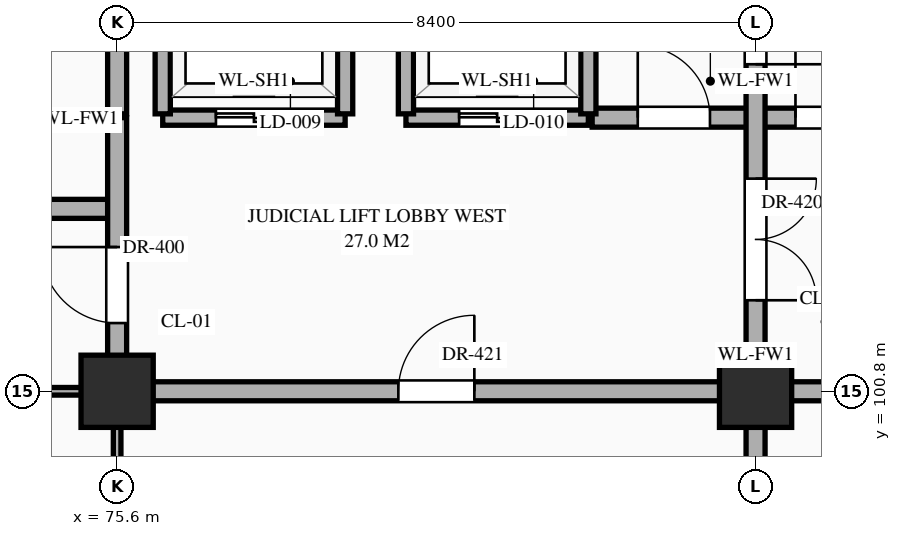
"""IFC4 building model, lengths in metres.
Left out: names, types, materials, properties, quantities, classifications, styles, units other than length and angle.
Written with IfcOpenShell. Run it as: python <this file> out.ifc"""

import sys

from ifc_helpers import new_model, si_unit, direction, frame, frame_2d, origin, origin_2d, place, context, subcontext, project, spatial, rectangle, extrude, element, fill, save


model = new_model("IFC4")
c1 = context("Model", 3, precision=1e-05, world=origin(), true_north=direction((0.0, 1.0)))
c2 = subcontext(c1, "Body", "Model", "MODEL_VIEW")
j1 = project(units=[si_unit("LENGTHUNIT", "METRE"), si_unit("PLANEANGLEUNIT", "RADIAN")], contexts=[c1])
p1 = place(None, origin())
s1 = spatial("IfcSite", under=j1, at=p1, CompositionType="ELEMENT")
p2 = place(p1, origin())
s2 = spatial("IfcBuilding", under=s1, at=p2, CompositionType="ELEMENT")
p3 = place(p2, frame((0.0, 0.0, -5.4)))
s3 = spatial("IfcBuildingStorey", under=s2, at=p3, CompositionType="ELEMENT", Elevation=-5.4)
for number, where, z_axis, x_axis in (
    (1, (75.6, 100.8, 0.0), (0.0, 0.0, 1.0), (1.0, 0.0, 0.0)),
    (2, (84.0, 100.8, 0.0), (0.0, 0.0, 1.0), (1.0, 0.0, 0.0)),
):
    element("IfcColumn", number, at=place(p3, frame(where, z_axis=z_axis, x_axis=x_axis)), inside=s3, PredefinedType="COLUMN", context=c2, shape_type="SweptSolid", body=[
        extrude(rectangle(XDim=0.95, YDim=0.95, at=origin_2d()), origin(), (0.0, 0.0, 1.0), 5.4),
    ])
p4 = place(p3, frame((71.4, 100.8, 0.0), z_axis=(0.0, 0.0, 1.0), x_axis=(1.0, 0.0, 0.0)))
e3 = element("IfcWall", 3, at=p4, inside=s3, PredefinedType="STANDARD", context=c2, shape_type="SweptSolid", body=[
    extrude(rectangle(XDim=4.2, YDim=0.1, at=frame_2d((2.1, 0.0))), origin(), (0.0, 0.0, 1.0), 4.25),
])
p5 = place(p4, frame((1.282, 0.0, 0.0)))
e4 = element("IfcOpeningElement", 4, at=p5, cuts=e3, PredefinedType="OPENING", context=c2, shape_type="SweptSolid", body=[
    extrude(rectangle(XDim=1.24, YDim=2.3, at=frame_2d((0.62, 1.15))), frame((0.0, 0.062, 0.0), z_axis=(0.0, -1.0, 0.0), x_axis=(1.0, 0.0, 0.0)), (0.0, 0.0, 1.0), 0.124),
])
p6 = place(p3, frame((75.6, 100.8, 0.0), z_axis=(0.0, 0.0, 1.0), x_axis=(1.0, 0.0, 0.0)))
e5 = element("IfcWall", 5, at=p6, inside=s3, PredefinedType="STANDARD", context=c2, shape_type="SweptSolid", body=[
    extrude(rectangle(XDim=16.8, YDim=0.25, at=frame_2d((8.4, 0.0))), origin(), (0.0, 0.0, 1.0), 4.25),
])
p7 = place(p6, frame((3.7, 0.0, 0.0)))
e6 = element("IfcOpeningElement", 6, at=p7, cuts=e5, PredefinedType="OPENING", context=c2, shape_type="SweptSolid", body=[
    extrude(rectangle(XDim=1.0, YDim=2.2, at=frame_2d((0.5, 1.1))), frame((0.0, 0.137, 0.0), z_axis=(0.0, -1.0, 0.0), x_axis=(1.0, 0.0, 0.0)), (0.0, 0.0, 1.0), 0.274),
])
p8 = place(p6, frame((9.748, 0.0, 0.0)))
e7 = element("IfcOpeningElement", 7, at=p8, cuts=e5, PredefinedType="OPENING", context=c2, shape_type="SweptSolid", body=[
    extrude(rectangle(XDim=1.1, YDim=2.2, at=frame_2d((0.55, 1.1))), frame((0.0, 0.137, 0.0), z_axis=(0.0, -1.0, 0.0), x_axis=(1.0, 0.0, 0.0)), (0.0, 0.0, 1.0), 0.274),
])
p9 = place(p6, frame((12.5, 0.0, 0.0)))
e8 = element("IfcOpeningElement", 8, at=p9, cuts=e5, PredefinedType="OPENING", context=c2, shape_type="SweptSolid", body=[
    extrude(rectangle(XDim=1.0, YDim=2.2, at=frame_2d((0.5, 1.1))), frame((0.0, 0.137, 0.0), z_axis=(0.0, -1.0, 0.0), x_axis=(1.0, 0.0, 0.0)), (0.0, 0.0, 1.0), 0.274),
])
p10 = place(p6, frame((14.827, 0.0, 0.0)))
e9 = element("IfcOpeningElement", 9, at=p10, cuts=e5, PredefinedType="OPENING", context=c2, shape_type="SweptSolid", body=[
    extrude(rectangle(XDim=0.95, YDim=2.15, at=frame_2d((0.475, 1.075))), frame((0.0, 0.137, 0.0), z_axis=(0.0, -1.0, 0.0), x_axis=(1.0, 0.0, 0.0)), (0.0, 0.0, 1.0), 0.274),
])
p11 = place(p3, frame((71.4, 103.2, 0.0), z_axis=(0.0, 0.0, 1.0), x_axis=(1.0, 0.0, 0.0)))
e10 = element("IfcWall", 10, at=p11, inside=s3, PredefinedType="STANDARD", context=c2, shape_type="SweptSolid", body=[
    extrude(rectangle(XDim=4.2, YDim=0.25, at=frame_2d((2.1, 0.0))), origin(), (0.0, 0.0, 1.0), 5.1),
])
p12 = place(p11, frame((1.55, 0.0, 0.0)))
e11 = element("IfcOpeningElement", 11, at=p12, cuts=e10, PredefinedType="OPENING", context=c2, shape_type="SweptSolid", body=[
    extrude(rectangle(XDim=1.1, YDim=2.2, at=frame_2d((0.55, 1.1))), frame((0.0, 0.137, 0.0), z_axis=(0.0, -1.0, 0.0), x_axis=(1.0, 0.0, 0.0)), (0.0, 0.0, 1.0), 0.274),
])
p13 = place(p3, frame((76.2, 104.4, 0.0), z_axis=(0.0, 0.0, 1.0), x_axis=(1.0, 0.0, 0.0)))
e12 = element("IfcWall", 12, at=p13, inside=s3, PredefinedType="STANDARD", context=c2, shape_type="SweptSolid", body=[
    extrude(rectangle(XDim=2.4, YDim=0.2, at=frame_2d((1.2, 0.0))), origin(), (0.0, 0.0, 1.0), 5.1),
])
p14 = place(p13, frame((0.7, 0.0, 0.0)))
e13 = element("IfcOpeningElement", 13, at=p14, cuts=e12, PredefinedType="OPENING", context=c2, shape_type="SweptSolid", body=[
    extrude(rectangle(XDim=1.0, YDim=2.15, at=frame_2d((0.5, 1.075))), frame((0.0, 0.112, 0.0), z_axis=(0.0, -1.0, 0.0), x_axis=(1.0, 0.0, 0.0)), (0.0, 0.0, 1.0), 0.224),
])
p15 = place(p3, frame((79.4, 104.4, 0.0), z_axis=(0.0, 0.0, 1.0), x_axis=(1.0, 0.0, 0.0)))
e14 = element("IfcWall", 14, at=p15, inside=s3, PredefinedType="STANDARD", context=c2, shape_type="SweptSolid", body=[
    extrude(rectangle(XDim=2.4, YDim=0.2, at=frame_2d((1.2, 0.0))), origin(), (0.0, 0.0, 1.0), 5.1),
])
p16 = place(p15, frame((0.7, 0.0, 0.0)))
e15 = element("IfcOpeningElement", 15, at=p16, cuts=e14, PredefinedType="OPENING", context=c2, shape_type="SweptSolid", body=[
    extrude(rectangle(XDim=1.0, YDim=2.15, at=frame_2d((0.5, 1.075))), frame((0.0, 0.112, 0.0), z_axis=(0.0, -1.0, 0.0), x_axis=(1.0, 0.0, 0.0)), (0.0, 0.0, 1.0), 0.224),
])
p17 = place(p3, frame((81.85, 104.4, 0.0), z_axis=(0.0, 0.0, 1.0), x_axis=(1.0, 0.0, 0.0)))
e16 = element("IfcWall", 16, at=p17, inside=s3, PredefinedType="STANDARD", context=c2, shape_type="SweptSolid", body=[
    extrude(rectangle(XDim=4.3, YDim=0.25, at=frame_2d((2.15, 0.0))), origin(), (0.0, 0.0, 1.0), 5.1),
])
p18 = place(p17, frame((0.6, 0.0, 0.0)))
e17 = element("IfcOpeningElement", 17, at=p18, cuts=e16, PredefinedType="OPENING", context=c2, shape_type="SweptSolid", body=[
    extrude(rectangle(XDim=0.95, YDim=2.15, at=frame_2d((0.475, 1.075))), frame((0.0, 0.137, 0.0), z_axis=(0.0, -1.0, 0.0), x_axis=(1.0, 0.0, 0.0)), (0.0, 0.0, 1.0), 0.274),
])
p19 = place(p17, frame((2.675, 0.0, 0.0)))
e18 = element("IfcOpeningElement", 18, at=p19, cuts=e16, PredefinedType="OPENING", context=c2, shape_type="SweptSolid", body=[
    extrude(rectangle(XDim=1.1, YDim=2.2, at=frame_2d((0.55, 1.1))), frame((0.0, 0.137, 0.0), z_axis=(0.0, -1.0, 0.0), x_axis=(1.0, 0.0, 0.0)), (0.0, 0.0, 1.0), 0.274),
])
p20 = place(p3, frame((75.6, 96.0, 0.0), z_axis=(0.0, 0.0, 1.0), x_axis=(0.0, 1.0, 0.0)))
e19 = element("IfcWall", 19, at=p20, inside=s3, PredefinedType="STANDARD", context=c2, shape_type="SweptSolid", body=[
    extrude(rectangle(XDim=4.8, YDim=0.1, at=frame_2d((2.4, 0.0))), origin(), (0.0, 0.0, 1.0), 4.35),
])
p21 = place(p3, frame((75.6, 100.8, 0.0), z_axis=(0.0, 0.0, 1.0), x_axis=(0.0, 1.0, 0.0)))
e20 = element("IfcWall", 20, at=p21, inside=s3, PredefinedType="STANDARD", context=c2, shape_type="SweptSolid", body=[
    extrude(rectangle(XDim=3.6, YDim=0.25, at=frame_2d((1.8, 0.0))), origin(), (0.0, 0.0, 1.0), 4.35),
])
p22 = place(p21, frame((0.897, 0.0, 0.0)))
e21 = element("IfcOpeningElement", 21, at=p22, cuts=e20, PredefinedType="OPENING", context=c2, shape_type="SweptSolid", body=[
    extrude(rectangle(XDim=1.0, YDim=2.2, at=frame_2d((0.5, 1.1))), frame((0.0, 0.137, 0.0), z_axis=(0.0, -1.0, 0.0), x_axis=(1.0, 0.0, 0.0)), (0.0, 0.0, 1.0), 0.274),
])
p23 = place(p3, frame((75.6, 104.45, 0.0), z_axis=(0.0, 0.0, 1.0), x_axis=(0.0, 1.0, 0.0)))
e22 = element("IfcWall", 22, at=p23, inside=s3, PredefinedType="STANDARD", context=c2, shape_type="SweptSolid", body=[
    extrude(rectangle(XDim=3.5, YDim=0.25, at=frame_2d((1.75, 0.0))), origin(), (0.0, 0.0, 1.0), 4.35),
])
for number, where, z_axis, x_axis in (
    (23, (76.2, 104.45, 0.0), (0.0, 0.0, 1.0), (0.0, 1.0, 0.0)),
    (24, (78.6, 104.45, 0.0), (0.0, 0.0, 1.0), (0.0, 1.0, 0.0)),
    (25, (79.4, 104.45, 0.0), (0.0, 0.0, 1.0), (0.0, 1.0, 0.0)),
    (26, (81.8, 104.45, 0.0), (0.0, 0.0, 1.0), (0.0, 1.0, 0.0)),
):
    element("IfcWall", number, at=place(p3, frame(where, z_axis=z_axis, x_axis=x_axis)), inside=s3, PredefinedType="STANDARD", context=c2, shape_type="SweptSolid", body=[
        extrude(rectangle(XDim=2.3, YDim=0.2, at=frame_2d((1.15, 0.0))), origin(), (0.0, 0.0, 1.0), 5.1),
    ])
p24 = place(p3, frame((84.0, 79.2, 0.0), z_axis=(0.0, 0.0, 1.0), x_axis=(0.0, 1.0, 0.0)))
e27 = element("IfcWall", 27, at=p24, inside=s3, PredefinedType="STANDARD", context=c2, shape_type="SweptSolid", body=[
    extrude(rectangle(XDim=35.96, YDim=0.25, at=frame_2d((17.98, 0.0))), origin(), (0.0, 0.0, 1.0), 4.35),
])
p25 = place(p24, frame((22.798, 0.0, 0.0)))
e28 = element("IfcOpeningElement", 28, at=p25, cuts=e27, PredefinedType="OPENING", context=c2, shape_type="SweptSolid", body=[
    extrude(rectangle(XDim=1.6, YDim=2.3, at=frame_2d((0.8, 1.15))), frame((0.0, 0.137, 0.0), z_axis=(0.0, -1.0, 0.0), x_axis=(1.0, 0.0, 0.0)), (0.0, 0.0, 1.0), 0.274),
])
p26 = place(p24, frame((12.528, 0.0, 0.0)))
e29 = element("IfcOpeningElement", 29, at=p26, cuts=e27, PredefinedType="OPENING", context=c2, shape_type="SweptSolid", body=[
    extrude(rectangle(XDim=0.95, YDim=2.15, at=frame_2d((0.475, 1.075))), frame((0.0, 0.137, 0.0), z_axis=(0.0, -1.0, 0.0), x_axis=(1.0, 0.0, 0.0)), (0.0, 0.0, 1.0), 0.274),
])
p27 = place(p24, frame((15.323, 0.0, 0.0)))
e30 = element("IfcOpeningElement", 30, at=p27, cuts=e27, PredefinedType="OPENING", context=c2, shape_type="SweptSolid", body=[
    extrude(rectangle(XDim=0.95, YDim=2.15, at=frame_2d((0.475, 1.075))), frame((0.0, 0.137, 0.0), z_axis=(0.0, -1.0, 0.0), x_axis=(1.0, 0.0, 0.0)), (0.0, 0.0, 1.0), 0.274),
])
p28 = place(p24, frame((25.903, 0.0, 0.0)))
e31 = element("IfcOpeningElement", 31, at=p28, cuts=e27, PredefinedType="OPENING", context=c2, shape_type="SweptSolid", body=[
    extrude(rectangle(XDim=1.8, YDim=2.35, at=frame_2d((0.9, 1.175))), frame((0.0, 0.137, 0.0), z_axis=(0.0, -1.0, 0.0), x_axis=(1.0, 0.0, 0.0)), (0.0, 0.0, 1.0), 0.274),
])
p29 = place(p24, frame((29.722, 0.0, 0.0)))
e32 = element("IfcOpeningElement", 32, at=p29, cuts=e27, PredefinedType="OPENING", context=c2, shape_type="SweptSolid", body=[
    extrude(rectangle(XDim=0.95, YDim=2.15, at=frame_2d((0.475, 1.075))), frame((0.0, 0.137, 0.0), z_axis=(0.0, -1.0, 0.0), x_axis=(1.0, 0.0, 0.0)), (0.0, 0.0, 1.0), 0.274),
])
p30 = place(p24, frame((5.327, 0.0, 0.0)))
e33 = element("IfcOpeningElement", 33, at=p30, cuts=e27, PredefinedType="OPENING", context=c2, shape_type="SweptSolid", body=[
    extrude(rectangle(XDim=0.95, YDim=2.15, at=frame_2d((0.475, 1.075))), frame((0.0, 0.137, 0.0), z_axis=(0.0, -1.0, 0.0), x_axis=(1.0, 0.0, 0.0)), (0.0, 0.0, 1.0), 0.274),
])
p31 = place(p14, origin())
e34 = element("IfcDoor", 34, at=p31, inside=s3, OperationType="DOUBLE_DOOR_SLIDING", PredefinedType="DOOR", context=c2, shape_type="SweptSolid", body=[
    extrude(rectangle(XDim=1.0, YDim=2.15, at=frame_2d((0.5, 1.075))), frame((0.0, 0.025, 0.0), z_axis=(0.0, -1.0, 0.0), x_axis=(1.0, 0.0, 0.0)), (0.0, 0.0, 1.0), 0.05),
])
fill(e13, e34)
p32 = place(p16, origin())
e35 = element("IfcDoor", 35, at=p32, inside=s3, OperationType="DOUBLE_DOOR_SLIDING", PredefinedType="DOOR", context=c2, shape_type="SweptSolid", body=[
    extrude(rectangle(XDim=1.0, YDim=2.15, at=frame_2d((0.5, 1.075))), frame((0.0, 0.025, 0.0), z_axis=(0.0, -1.0, 0.0), x_axis=(1.0, 0.0, 0.0)), (0.0, 0.0, 1.0), 0.05),
])
fill(e15, e35)
p33 = place(p22, origin())
e36 = element("IfcDoor", 36, at=p33, inside=s3, OperationType="SINGLE_SWING_RIGHT", PredefinedType="DOOR", context=c2, shape_type="SweptSolid", body=[
    extrude(rectangle(XDim=1.0, YDim=2.2, at=frame_2d((0.5, 1.1))), frame((0.0, 0.025, 0.0), z_axis=(0.0, -1.0, 0.0), x_axis=(1.0, 0.0, 0.0)), (0.0, 0.0, 1.0), 0.05),
])
fill(e21, e36)
p34 = place(p25, frame((1.6, 0.0, 0.0), z_axis=(0.0, 0.0, 1.0), x_axis=(-1.0, 0.0, 0.0)))
e37 = element("IfcDoor", 37, at=p34, inside=s3, OperationType="DOUBLE_DOOR_SINGLE_SWING", PredefinedType="DOOR", context=c2, shape_type="SweptSolid", body=[
    extrude(rectangle(XDim=1.6, YDim=2.3, at=frame_2d((0.8, 1.15))), frame((0.0, 0.025, 0.0), z_axis=(0.0, -1.0, 0.0), x_axis=(1.0, 0.0, 0.0)), (0.0, 0.0, 1.0), 0.05),
])
fill(e28, e37)
p35 = place(p7, origin())
e38 = element("IfcDoor", 38, at=p35, inside=s3, OperationType="SINGLE_SWING_RIGHT", PredefinedType="DOOR", context=c2, shape_type="SweptSolid", body=[
    extrude(rectangle(XDim=1.0, YDim=2.2, at=frame_2d((0.5, 1.1))), frame((0.0, 0.025, 0.0), z_axis=(0.0, -1.0, 0.0), x_axis=(1.0, 0.0, 0.0)), (0.0, 0.0, 1.0), 0.05),
])
fill(e6, e38)
p36 = place(p18, origin())
e39 = element("IfcDoor", 39, at=p36, inside=s3, OperationType="SINGLE_SWING_LEFT", PredefinedType="DOOR", context=c2, shape_type="SweptSolid", body=[
    extrude(rectangle(XDim=0.95, YDim=2.15, at=frame_2d((0.475, 1.075))), frame((0.0, 0.025, 0.0), z_axis=(0.0, -1.0, 0.0), x_axis=(1.0, 0.0, 0.0)), (0.0, 0.0, 1.0), 0.05),
])
fill(e17, e39)
p37 = place(p19, origin())
e40 = element("IfcDoor", 40, at=p37, inside=s3, OperationType="SINGLE_SWING_LEFT", PredefinedType="DOOR", context=c2, shape_type="SweptSolid", body=[
    extrude(rectangle(XDim=1.1, YDim=2.2, at=frame_2d((0.55, 1.1))), frame((0.0, 0.025, 0.0), z_axis=(0.0, -1.0, 0.0), x_axis=(1.0, 0.0, 0.0)), (0.0, 0.0, 1.0), 0.05),
])
fill(e18, e40)
p38 = place(p28, frame((1.8, 0.0, 0.0), z_axis=(0.0, 0.0, 1.0), x_axis=(-1.0, 0.0, 0.0)))
e41 = element("IfcDoor", 41, at=p38, inside=s3, OperationType="DOUBLE_DOOR_SINGLE_SWING", PredefinedType="DOOR", context=c2, shape_type="SweptSolid", body=[
    extrude(rectangle(XDim=1.8, YDim=2.35, at=frame_2d((0.9, 1.175))), frame((0.0, 0.025, 0.0), z_axis=(0.0, -1.0, 0.0), x_axis=(1.0, 0.0, 0.0)), (0.0, 0.0, 1.0), 0.05),
])
fill(e31, e41)
save(model, sys.argv[1])
